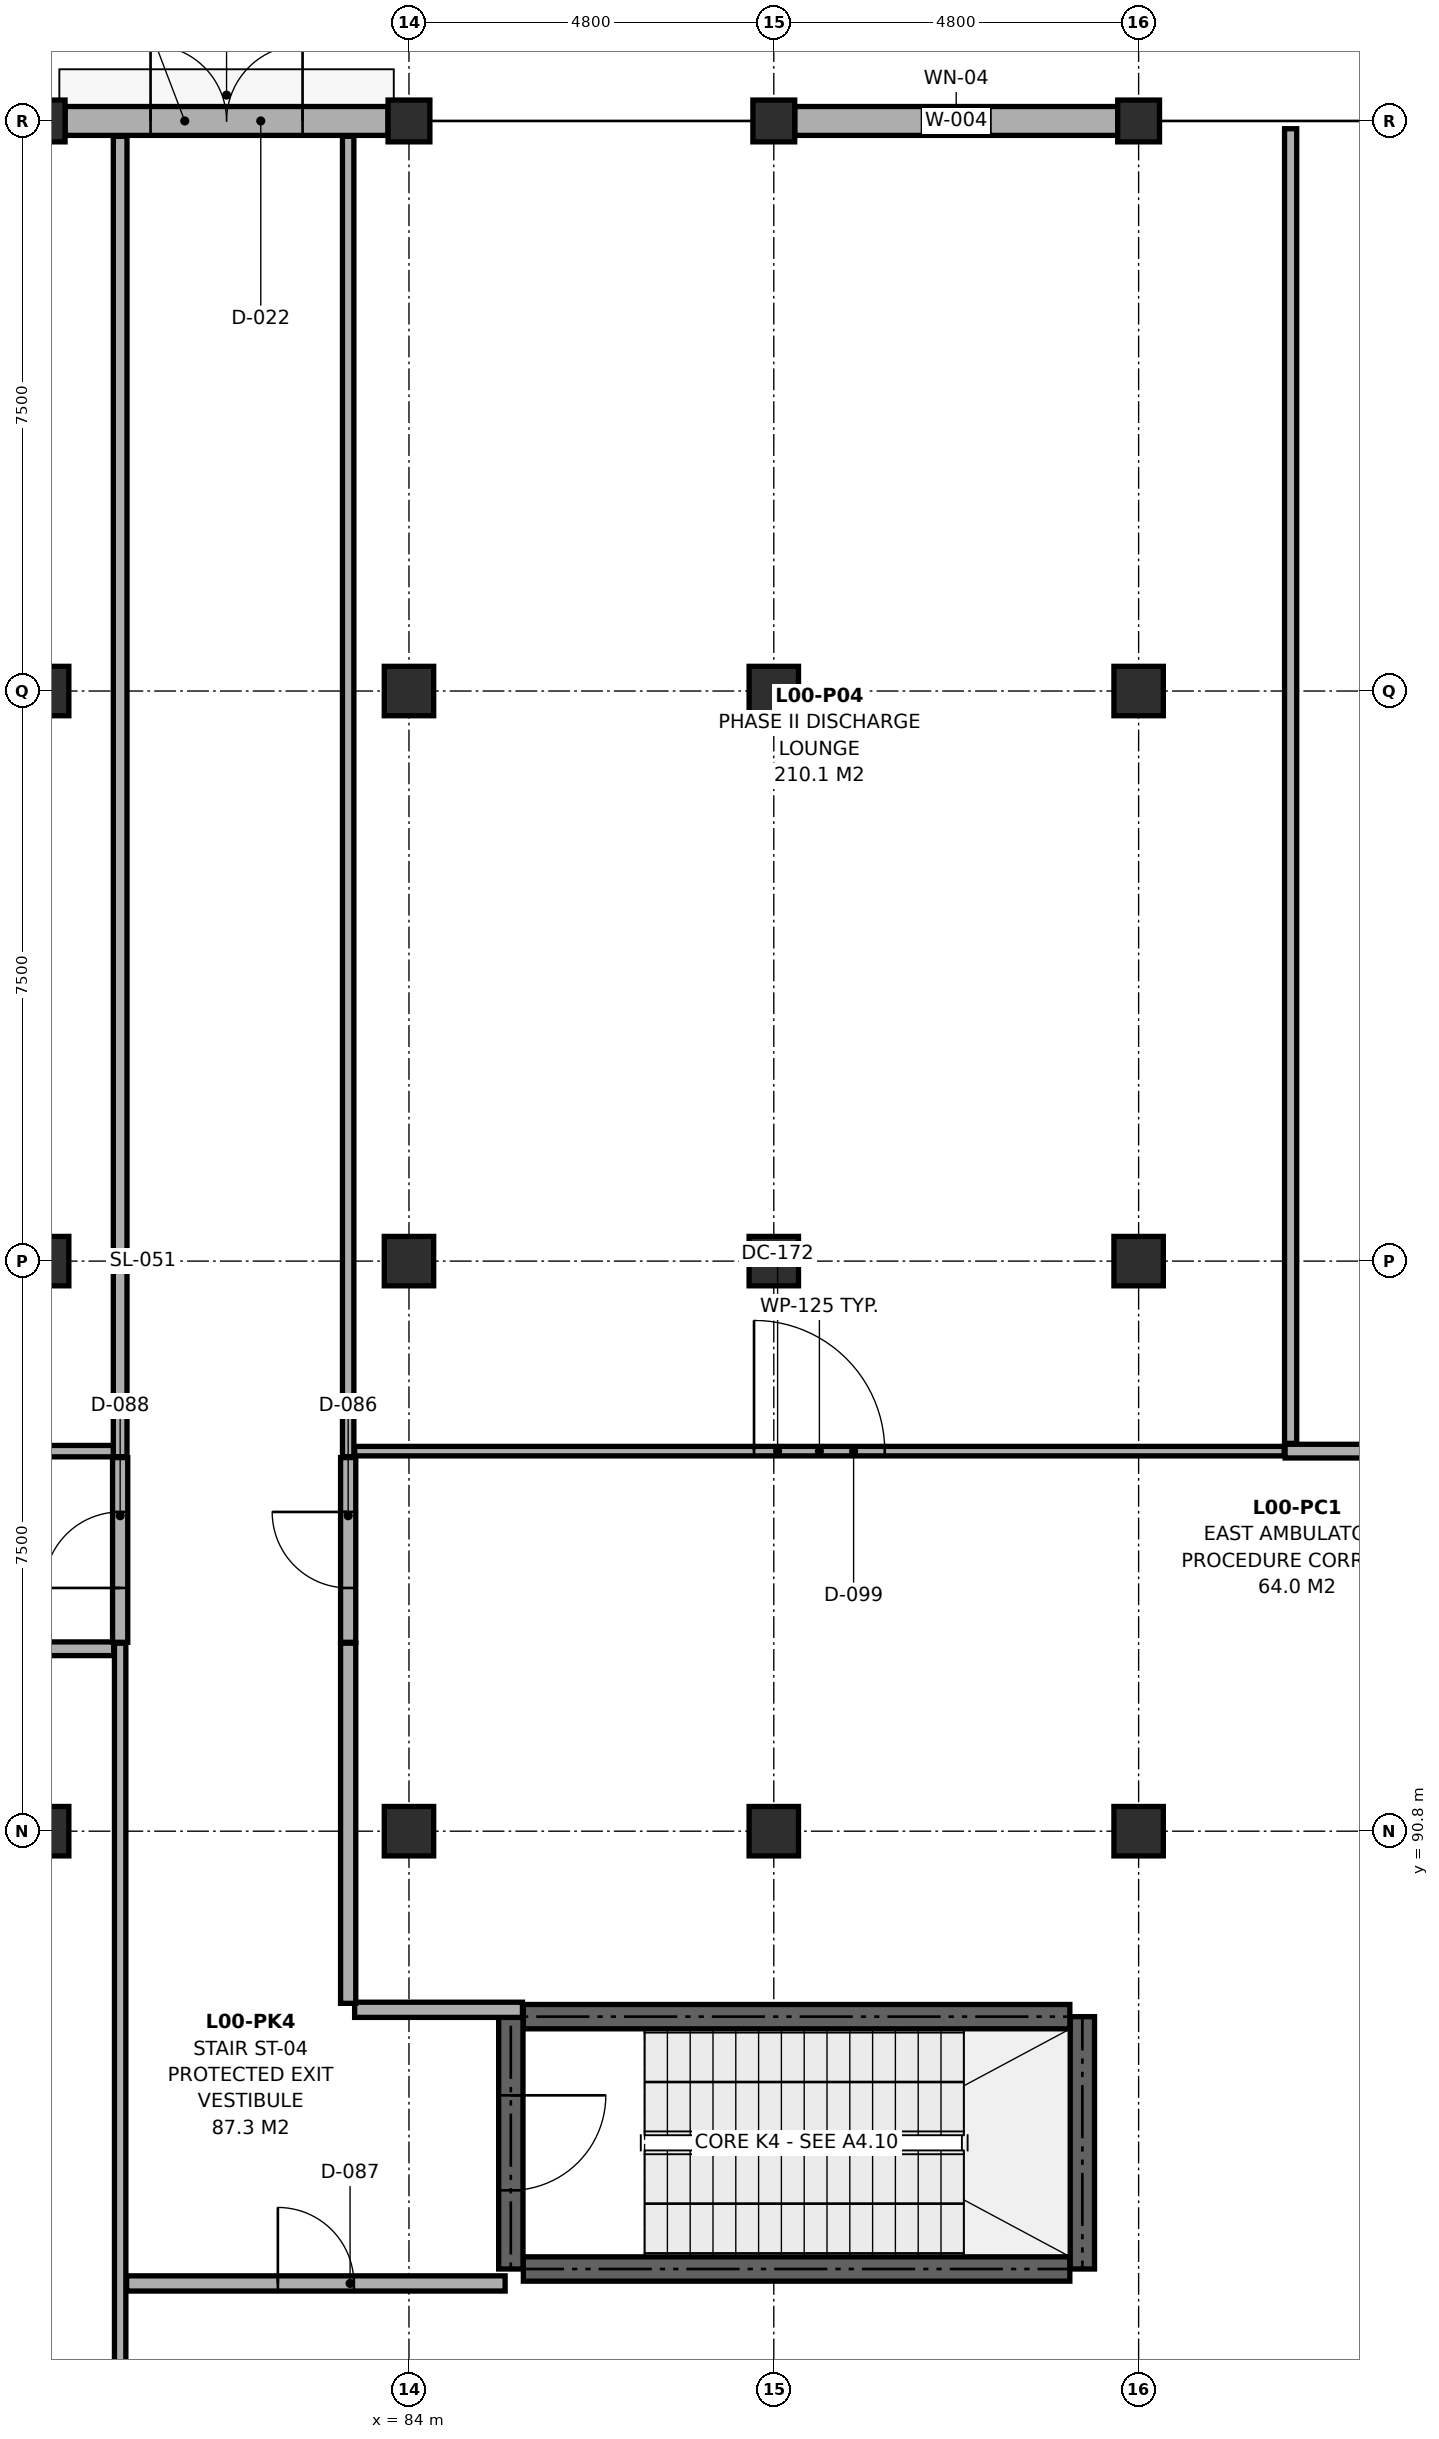
"""IFC4 building model, lengths in metres.
Left out: names, types, materials, properties, quantities, classifications, styles, units other than length and angle.
Written with IfcOpenShell. Run it as: python <this file> out.ifc"""

import sys

from ifc_helpers import new_model, si_unit, direction, frame, frame_2d, origin, origin_2d, place, context, subcontext, project, spatial, rectangle, extrude, element, fill, save


model = new_model("IFC4")
c1 = context("Model", 3, precision=1e-05, world=origin(), true_north=direction((0.0, 1.0)))
c2 = subcontext(c1, "Body", "Model", "MODEL_VIEW")
j1 = project(units=[si_unit("LENGTHUNIT", "METRE"), si_unit("PLANEANGLEUNIT", "RADIAN")], contexts=[c1])
p1 = place(None, origin())
s1 = spatial("IfcSite", under=j1, at=p1, CompositionType="ELEMENT")
p2 = place(p1, origin())
s2 = spatial("IfcBuilding", under=s1, at=p2, CompositionType="ELEMENT")
p3 = place(p2, origin())
s3 = spatial("IfcBuildingStorey", under=s2, at=p3, CompositionType="ELEMENT", Elevation=0.0)
for number, where, z_axis, x_axis in (
    (1, (79.2, 90.8, 0.0), (0.0, 0.0, 1.0), (1.0, 0.0, 0.0)),
    (2, (79.2, 98.3, 0.0), (0.0, 0.0, 1.0), (1.0, 0.0, 0.0)),
    (3, (79.2, 105.8, 0.0), (0.0, 0.0, 1.0), (1.0, 0.0, 0.0)),
):
    element("IfcColumn", number, at=place(p3, frame(where, z_axis=z_axis, x_axis=x_axis)), inside=s3, PredefinedType="COLUMN", context=c2, shape_type="SweptSolid", body=[
        extrude(rectangle(XDim=0.65, YDim=0.65, at=origin_2d()), origin(), (0.0, 0.0, 1.0), 4.7),
    ])
p4 = place(p3, frame((79.2, 113.3, 0.0), z_axis=(0.0, 0.0, 1.0), x_axis=(1.0, 0.0, 0.0)))
e4 = element("IfcColumn", 4, at=p4, inside=s3, PredefinedType="COLUMN", context=c2, shape_type="SweptSolid", body=[
    extrude(rectangle(XDim=0.55, YDim=0.55, at=origin_2d()), origin(), (0.0, 0.0, 1.0), 4.7),
])
for number, where, z_axis, x_axis in (
    (5, (84.0, 90.8, 0.0), (0.0, 0.0, 1.0), (1.0, 0.0, 0.0)),
    (6, (84.0, 98.3, 0.0), (0.0, 0.0, 1.0), (1.0, 0.0, 0.0)),
    (7, (84.0, 105.8, 0.0), (0.0, 0.0, 1.0), (1.0, 0.0, 0.0)),
):
    element("IfcColumn", number, at=place(p3, frame(where, z_axis=z_axis, x_axis=x_axis)), inside=s3, PredefinedType="COLUMN", context=c2, shape_type="SweptSolid", body=[
        extrude(rectangle(XDim=0.65, YDim=0.65, at=origin_2d()), origin(), (0.0, 0.0, 1.0), 4.7),
    ])
p5 = place(p3, frame((84.0, 113.3, 0.0), z_axis=(0.0, 0.0, 1.0), x_axis=(1.0, 0.0, 0.0)))
e8 = element("IfcColumn", 8, at=p5, inside=s3, PredefinedType="COLUMN", context=c2, shape_type="SweptSolid", body=[
    extrude(rectangle(XDim=0.55, YDim=0.55, at=origin_2d()), origin(), (0.0, 0.0, 1.0), 4.7),
])
for number, where, z_axis, x_axis in (
    (9, (88.8, 90.8, 0.0), (0.0, 0.0, 1.0), (1.0, 0.0, 0.0)),
    (10, (88.8, 98.3, 0.0), (0.0, 0.0, 1.0), (1.0, 0.0, 0.0)),
    (11, (88.8, 105.8, 0.0), (0.0, 0.0, 1.0), (1.0, 0.0, 0.0)),
):
    element("IfcColumn", number, at=place(p3, frame(where, z_axis=z_axis, x_axis=x_axis)), inside=s3, PredefinedType="COLUMN", context=c2, shape_type="SweptSolid", body=[
        extrude(rectangle(XDim=0.65, YDim=0.65, at=origin_2d()), origin(), (0.0, 0.0, 1.0), 4.7),
    ])
p6 = place(p3, frame((88.8, 113.3, 0.0), z_axis=(0.0, 0.0, 1.0), x_axis=(1.0, 0.0, 0.0)))
e12 = element("IfcColumn", 12, at=p6, inside=s3, PredefinedType="COLUMN", context=c2, shape_type="SweptSolid", body=[
    extrude(rectangle(XDim=0.55, YDim=0.55, at=origin_2d()), origin(), (0.0, 0.0, 1.0), 4.7),
])
for number, where, z_axis, x_axis in (
    (13, (93.6, 90.8, 0.0), (0.0, 0.0, 1.0), (1.0, 0.0, 0.0)),
    (14, (93.6, 98.3, 0.0), (0.0, 0.0, 1.0), (1.0, 0.0, 0.0)),
    (15, (93.6, 105.8, 0.0), (0.0, 0.0, 1.0), (1.0, 0.0, 0.0)),
):
    element("IfcColumn", number, at=place(p3, frame(where, z_axis=z_axis, x_axis=x_axis)), inside=s3, PredefinedType="COLUMN", context=c2, shape_type="SweptSolid", body=[
        extrude(rectangle(XDim=0.65, YDim=0.65, at=origin_2d()), origin(), (0.0, 0.0, 1.0), 4.7),
    ])
p7 = place(p3, frame((93.6, 113.3, 0.0), z_axis=(0.0, 0.0, 1.0), x_axis=(1.0, 0.0, 0.0)))
e16 = element("IfcColumn", 16, at=p7, inside=s3, PredefinedType="COLUMN", context=c2, shape_type="SweptSolid", body=[
    extrude(rectangle(XDim=0.55, YDim=0.55, at=origin_2d()), origin(), (0.0, 0.0, 1.0), 4.7),
])
p8 = place(p3, frame((79.475, 113.3, 0.0), z_axis=(0.0, 0.0, 1.0), x_axis=(1.0, 0.0, 0.0)))
e17 = element("IfcWall", 17, at=p8, inside=s3, PredefinedType="SOLIDWALL", context=c2, shape_type="SweptSolid", body=[
    extrude(rectangle(XDim=4.25, YDim=0.38, at=frame_2d((2.125, 0.0))), origin(), (0.0, 0.0, 1.0), 3.985),
])
p9 = place(p8, frame((1.125, 0.0, 0.0)))
e18 = element("IfcOpeningElement", 18, at=p9, cuts=e17, PredefinedType="OPENING", context=c2, shape_type="SweptSolid", body=[
    extrude(rectangle(XDim=2.0, YDim=2.35, at=frame_2d((1.0, 1.175))), frame((0.0, 0.202, 0.0), z_axis=(0.0, -1.0, 0.0), x_axis=(1.0, 0.0, 0.0)), (0.0, 0.0, 1.0), 0.404),
])
p10 = place(p3, frame((89.075, 113.3, 0.0), z_axis=(0.0, 0.0, 1.0), x_axis=(1.0, 0.0, 0.0)))
e19 = element("IfcWall", 19, at=p10, inside=s3, PredefinedType="SOLIDWALL", context=c2, shape_type="SweptSolid", body=[
    extrude(rectangle(XDim=4.25, YDim=0.38, at=frame_2d((2.125, 0.0))), origin(), (0.0, 0.0, 1.0), 3.985),
])
p11 = place(p10, frame((1.675, 0.0, 0.9)))
e20 = element("IfcOpeningElement", 20, at=p11, cuts=e19, PredefinedType="OPENING", context=c2, shape_type="SweptSolid", body=[
    extrude(rectangle(XDim=0.9, YDim=1.9, at=frame_2d((0.45, 0.95))), frame((0.0, 0.202, 0.0), z_axis=(0.0, -1.0, 0.0), x_axis=(1.0, 0.0, 0.0)), (0.0, 0.0, 1.0), 0.404),
])
p12 = place(p3, frame((85.505, 85.04, 0.0), z_axis=(0.0, 0.0, 1.0), x_axis=(1.0, 0.0, 0.0)))
e21 = element("IfcWall", 21, at=p12, inside=s3, PredefinedType="SHEAR", context=c2, shape_type="SweptSolid", body=[
    extrude(rectangle(XDim=7.19, YDim=0.32, at=frame_2d((3.595, 0.0))), origin(), (0.0, 0.0, 1.0), 4.7),
])
p13 = place(p3, frame((92.86, 85.04, 0.0), z_axis=(0.0, 0.0, 1.0), x_axis=(0.0, 1.0, 0.0)))
e22 = element("IfcWall", 22, at=p13, inside=s3, PredefinedType="SHEAR", context=c2, shape_type="SweptSolid", body=[
    extrude(rectangle(XDim=3.32, YDim=0.32, at=frame_2d((1.66, 0.0))), origin(), (0.0, 0.0, 1.0), 4.7),
])
p14 = place(p3, frame((92.695, 88.36, 0.0), z_axis=(0.0, 0.0, 1.0), x_axis=(-1.0, 0.0, 0.0)))
e23 = element("IfcWall", 23, at=p14, inside=s3, PredefinedType="SHEAR", context=c2, shape_type="SweptSolid", body=[
    extrude(rectangle(XDim=7.19, YDim=0.32, at=frame_2d((3.595, 0.0))), origin(), (0.0, 0.0, 1.0), 4.7),
])
p15 = place(p3, frame((85.34, 88.36, 0.0), z_axis=(0.0, 0.0, 1.0), x_axis=(0.0, -1.0, 0.0)))
e24 = element("IfcWall", 24, at=p15, inside=s3, PredefinedType="SHEAR", context=c2, shape_type="SweptSolid", body=[
    extrude(rectangle(XDim=3.32, YDim=0.32, at=frame_2d((1.66, 0.0))), origin(), (0.0, 0.0, 1.0), 4.7),
])
p16 = place(p15, frame((1.035, 0.0, 0.0)))
e25 = element("IfcOpeningElement", 25, at=p16, cuts=e24, PredefinedType="OPENING", context=c2, shape_type="SweptSolid", body=[
    extrude(rectangle(XDim=1.25, YDim=2.2, at=frame_2d((0.625, 1.1))), frame((0.0, 0.172, 0.0), z_axis=(0.0, -1.0, 0.0), x_axis=(1.0, 0.0, 0.0)), (0.0, 0.0, 1.0), 0.344),
])
p17 = place(p3, frame((70.527, 95.8, 0.0), z_axis=(0.0, 0.0, 1.0), x_axis=(1.0, 0.0, 0.0)))
e26 = element("IfcWall", 26, at=p17, inside=s3, PredefinedType="PARTITIONING", context=c2, shape_type="SweptSolid", body=[
    extrude(rectangle(XDim=9.588, YDim=0.15, at=frame_2d((4.794, 0.0))), origin(), (0.0, 0.0, 1.0), 3.985),
])
p18 = place(p17, frame((3.969, 0.0, 0.0)))
e27 = element("IfcOpeningElement", 27, at=p18, cuts=e26, PredefinedType="OPENING", context=c2, shape_type="SweptSolid", body=[
    extrude(rectangle(XDim=1.65, YDim=2.32, at=frame_2d((0.825, 1.16))), frame((0.0, 0.087, 0.0), z_axis=(0.0, -1.0, 0.0), x_axis=(1.0, 0.0, 0.0)), (0.0, 0.0, 1.0), 0.174),
])
p19 = place(p3, frame((83.285, 95.8, 0.0), z_axis=(0.0, 0.0, 1.0), x_axis=(1.0, 0.0, 0.0)))
e28 = element("IfcWall", 28, at=p19, inside=s3, PredefinedType="PARTITIONING", context=c2, shape_type="SweptSolid", body=[
    extrude(rectangle(XDim=12.23, YDim=0.125, at=frame_2d((6.115, 0.0))), origin(), (0.0, 0.0, 1.0), 3.985),
])
p20 = place(p19, frame((5.255, 0.0, 0.0)))
e29 = element("IfcOpeningElement", 29, at=p20, cuts=e28, PredefinedType="OPENING", context=c2, shape_type="SweptSolid", body=[
    extrude(rectangle(XDim=1.72, YDim=2.34, at=frame_2d((0.86, 1.17))), frame((0.0, 0.074, 0.0), z_axis=(0.0, -1.0, 0.0), x_axis=(1.0, 0.0, 0.0)), (0.0, 0.0, 1.0), 0.149),
])
p21 = place(p3, frame((95.527, 95.8, 0.0), z_axis=(0.0, 0.0, 1.0), x_axis=(1.0, 0.0, 0.0)))
e30 = element("IfcWall", 30, at=p21, inside=s3, PredefinedType="PARTITIONING", context=c2, shape_type="SweptSolid", body=[
    extrude(rectangle(XDim=8.188, YDim=0.18, at=frame_2d((4.094, 0.0))), origin(), (0.0, 0.0, 1.0), 3.985),
])
p22 = place(p21, frame((3.404, 0.0, 0.0)))
e31 = element("IfcOpeningElement", 31, at=p22, cuts=e30, PredefinedType="OPENING", context=c2, shape_type="SweptSolid", body=[
    extrude(rectangle(XDim=1.38, YDim=2.3, at=frame_2d((0.69, 1.15))), frame((0.0, 0.102, 0.0), z_axis=(0.0, -1.0, 0.0), x_axis=(1.0, 0.0, 0.0)), (0.0, 0.0, 1.0), 0.204),
])
p23 = place(p3, frame((74.027, 93.2, 0.0), z_axis=(0.0, 0.0, 1.0), x_axis=(1.0, 0.0, 0.0)))
e32 = element("IfcWall", 32, at=p23, inside=s3, PredefinedType="PARTITIONING", context=c2, shape_type="SweptSolid", body=[
    extrude(rectangle(XDim=6.088, YDim=0.18, at=frame_2d((3.044, 0.0))), origin(), (0.0, 0.0, 1.0), 3.985),
])
p24 = place(p23, frame((2.972, 0.0, 0.0)))
e33 = element("IfcOpeningElement", 33, at=p24, cuts=e32, PredefinedType="OPENING", context=c2, shape_type="SweptSolid", body=[
    extrude(rectangle(XDim=1.05, YDim=2.15, at=frame_2d((0.525, 1.075))), frame((0.0, 0.102, 0.0), z_axis=(0.0, -1.0, 0.0), x_axis=(1.0, 0.0, 0.0)), (0.0, 0.0, 1.0), 0.204),
])
p25 = place(p3, frame((80.2, 93.285, 0.0), z_axis=(0.0, 0.0, 1.0), x_axis=(0.0, 1.0, 0.0)))
e34 = element("IfcWall", 34, at=p25, inside=s3, PredefinedType="PARTITIONING", context=c2, shape_type="SweptSolid", body=[
    extrude(rectangle(XDim=2.43, YDim=0.2, at=frame_2d((1.215, 0.0))), origin(), (0.0, 0.0, 1.0), 4.7),
])
p26 = place(p25, frame((0.715, 0.0, 0.0)))
e35 = element("IfcOpeningElement", 35, at=p26, cuts=e34, PredefinedType="OPENING", context=c2, shape_type="SweptSolid", body=[
    extrude(rectangle(XDim=1.0, YDim=2.15, at=frame_2d((0.5, 1.075))), frame((0.0, 0.112, 0.0), z_axis=(0.0, -1.0, 0.0), x_axis=(1.0, 0.0, 0.0)), (0.0, 0.0, 1.0), 0.224),
])
p27 = place(p3, frame((83.2, 93.285, 0.0), z_axis=(0.0, 0.0, 1.0), x_axis=(0.0, 1.0, 0.0)))
e36 = element("IfcWall", 36, at=p27, inside=s3, PredefinedType="PARTITIONING", context=c2, shape_type="SweptSolid", body=[
    extrude(rectangle(XDim=2.43, YDim=0.2, at=frame_2d((1.215, 0.0))), origin(), (0.0, 0.0, 1.0), 4.7),
])
p28 = place(p27, frame((0.715, 0.0, 0.0)))
e37 = element("IfcOpeningElement", 37, at=p28, cuts=e36, PredefinedType="OPENING", context=c2, shape_type="SweptSolid", body=[
    extrude(rectangle(XDim=1.0, YDim=2.15, at=frame_2d((0.5, 1.075))), frame((0.0, 0.112, 0.0), z_axis=(0.0, -1.0, 0.0), x_axis=(1.0, 0.0, 0.0)), (0.0, 0.0, 1.0), 0.224),
])
p29 = place(p3, frame((80.285, 84.85, 0.0), z_axis=(0.0, 0.0, 1.0), x_axis=(1.0, 0.0, 0.0)))
e38 = element("IfcWall", 38, at=p29, inside=s3, PredefinedType="PARTITIONING", context=c2, shape_type="SweptSolid", body=[
    extrude(rectangle(XDim=4.98, YDim=0.2, at=frame_2d((2.49, 0.0))), origin(), (0.0, 0.0, 1.0), 3.985),
])
p30 = place(p29, frame((1.99, 0.0, 0.0)))
e39 = element("IfcOpeningElement", 39, at=p30, cuts=e38, PredefinedType="OPENING", context=c2, shape_type="SweptSolid", body=[
    extrude(rectangle(XDim=1.0, YDim=2.15, at=frame_2d((0.5, 1.075))), frame((0.0, 0.112, 0.0), z_axis=(0.0, -1.0, 0.0), x_axis=(1.0, 0.0, 0.0)), (0.0, 0.0, 1.0), 0.224),
])
p31 = place(p3, frame((80.2, 95.727, 0.0), z_axis=(0.0, 0.0, 1.0), x_axis=(0.0, 1.0, 0.0)))
e40 = element("IfcWall", 40, at=p31, inside=s3, PredefinedType="PARTITIONING", context=c2, shape_type="SweptSolid", body=[
    extrude(rectangle(XDim=17.371, YDim=0.18, at=frame_2d((8.686, 0.0))), origin(), (0.0, 0.0, 1.0), 4.035),
])
p32 = place(p3, frame((83.2, 95.727, 0.0), z_axis=(0.0, 0.0, 1.0), x_axis=(0.0, 1.0, 0.0)))
e41 = element("IfcWall", 41, at=p32, inside=s3, PredefinedType="PARTITIONING", context=c2, shape_type="SweptSolid", body=[
    extrude(rectangle(XDim=17.371, YDim=0.15, at=frame_2d((8.686, 0.0))), origin(), (0.0, 0.0, 1.0), 4.035),
])
p33 = place(p3, frame((95.6, 95.902, 0.0), z_axis=(0.0, 0.0, 1.0), x_axis=(0.0, 1.0, 0.0)))
e42 = element("IfcWall", 42, at=p33, inside=s3, PredefinedType="PARTITIONING", context=c2, shape_type="SweptSolid", body=[
    extrude(rectangle(XDim=17.296, YDim=0.16, at=frame_2d((8.648, 0.0))), origin(), (0.0, 0.0, 1.0), 4.035),
])
p34 = place(p3, frame((80.2, 83.665, 0.0), z_axis=(0.0, 0.0, 1.0), x_axis=(0.0, 1.0, 0.0)))
e43 = element("IfcWall", 43, at=p34, inside=s3, PredefinedType="PARTITIONING", context=c2, shape_type="SweptSolid", body=[
    extrude(rectangle(XDim=9.608, YDim=0.15, at=frame_2d((4.804, 0.0))), origin(), (0.0, 0.0, 1.0), 4.035),
])
p35 = place(p3, frame((83.285, 88.45, 0.0), z_axis=(0.0, 0.0, 1.0), x_axis=(1.0, 0.0, 0.0)))
e44 = element("IfcWall", 44, at=p35, inside=s3, PredefinedType="PARTITIONING", context=c2, shape_type="SweptSolid", body=[
    extrude(rectangle(XDim=2.208, YDim=0.2, at=frame_2d((1.104, 0.0))), origin(), (0.0, 0.0, 1.0), 3.985),
])
p36 = place(p3, frame((83.2, 88.535, 0.0), z_axis=(0.0, 0.0, 1.0), x_axis=(0.0, 1.0, 0.0)))
e45 = element("IfcWall", 45, at=p36, inside=s3, PredefinedType="PARTITIONING", context=c2, shape_type="SweptSolid", body=[
    extrude(rectangle(XDim=4.738, YDim=0.2, at=frame_2d((2.369, 0.0))), origin(), (0.0, 0.0, 1.0), 4.085),
])
p37 = place(p9, origin())
e46 = element("IfcDoor", 46, at=p37, inside=s3, OperationType="DOUBLE_DOOR_SINGLE_SWING", PredefinedType="DOOR", context=c2, shape_type="SweptSolid", body=[
    extrude(rectangle(XDim=2.0, YDim=2.35, at=frame_2d((1.0, 1.175))), frame((0.0, 0.025, 0.0), z_axis=(0.0, -1.0, 0.0), x_axis=(1.0, 0.0, 0.0)), (0.0, 0.0, 1.0), 0.05),
])
fill(e18, e46)
p38 = place(p11, origin())
e47 = element("IfcWindow", 47, at=p38, inside=s3, PartitioningType="SINGLE_PANEL", PredefinedType="WINDOW", context=c2, shape_type="SweptSolid", body=[
    extrude(rectangle(XDim=0.9, YDim=1.9, at=frame_2d((0.45, 0.95))), frame((0.0, 0.03, 0.0), z_axis=(0.0, -1.0, 0.0), x_axis=(1.0, 0.0, 0.0)), (0.0, 0.0, 1.0), 0.06),
])
fill(e20, e47)
p39 = place(p16, origin())
e48 = element("IfcDoor", 48, at=p39, inside=s3, OperationType="SINGLE_SWING_LEFT", PredefinedType="DOOR", context=c2, shape_type="SweptSolid", body=[
    extrude(rectangle(XDim=1.25, YDim=2.2, at=frame_2d((0.625, 1.1))), frame((0.0, 0.025, 0.0), z_axis=(0.0, -1.0, 0.0), x_axis=(1.0, 0.0, 0.0)), (0.0, 0.0, 1.0), 0.05),
])
fill(e25, e48)
p40 = place(p20, origin())
e49 = element("IfcDoor", 49, at=p40, inside=s3, OperationType="SINGLE_SWING_LEFT", PredefinedType="DOOR", context=c2, shape_type="SweptSolid", body=[
    extrude(rectangle(XDim=1.72, YDim=2.34, at=frame_2d((0.86, 1.17))), frame((0.0, 0.025, 0.0), z_axis=(0.0, -1.0, 0.0), x_axis=(1.0, 0.0, 0.0)), (0.0, 0.0, 1.0), 0.05),
])
fill(e29, e49)
p41 = place(p26, origin())
e50 = element("IfcDoor", 50, at=p41, inside=s3, OperationType="SINGLE_SWING_LEFT", PredefinedType="DOOR", context=c2, shape_type="SweptSolid", body=[
    extrude(rectangle(XDim=1.0, YDim=2.15, at=frame_2d((0.5, 1.075))), frame((0.0, 0.025, 0.0), z_axis=(0.0, -1.0, 0.0), x_axis=(1.0, 0.0, 0.0)), (0.0, 0.0, 1.0), 0.05),
])
fill(e35, e50)
p42 = place(p28, origin())
e51 = element("IfcDoor", 51, at=p42, inside=s3, OperationType="SINGLE_SWING_RIGHT", PredefinedType="DOOR", context=c2, shape_type="SweptSolid", body=[
    extrude(rectangle(XDim=1.0, YDim=2.15, at=frame_2d((0.5, 1.075))), frame((0.0, 0.025, 0.0), z_axis=(0.0, -1.0, 0.0), x_axis=(1.0, 0.0, 0.0)), (0.0, 0.0, 1.0), 0.05),
])
fill(e37, e51)
p43 = place(p30, origin())
e52 = element("IfcDoor", 52, at=p43, inside=s3, OperationType="SINGLE_SWING_LEFT", PredefinedType="DOOR", context=c2, shape_type="SweptSolid", body=[
    extrude(rectangle(XDim=1.0, YDim=2.15, at=frame_2d((0.5, 1.075))), frame((0.0, 0.025, 0.0), z_axis=(0.0, -1.0, 0.0), x_axis=(1.0, 0.0, 0.0)), (0.0, 0.0, 1.0), 0.05),
])
fill(e39, e52)
save(model, sys.argv[1])
